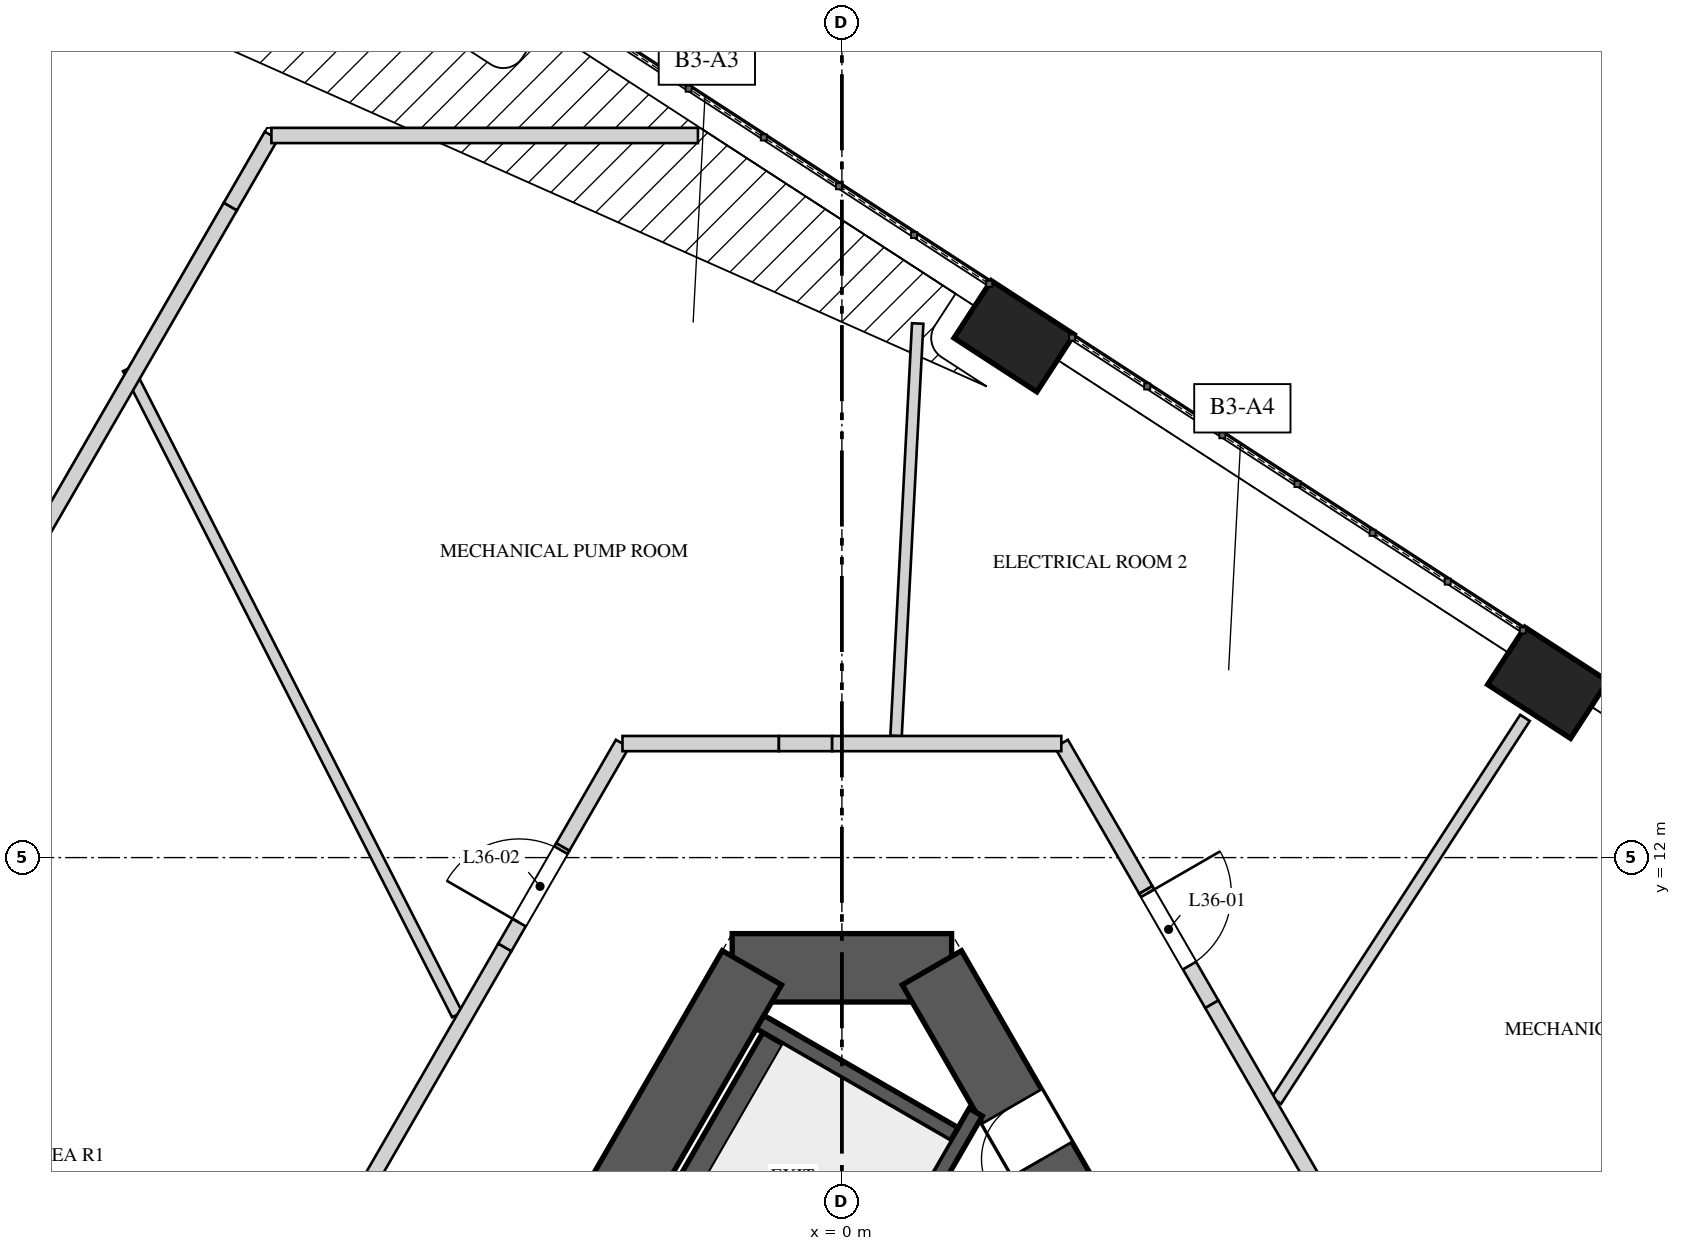
"""IFC4 building model, lengths in metres.
Left out: names, types, materials, properties, quantities, classifications, styles, units other than length and angle.
Written with IfcOpenShell. Run it as: python <this file> out.ifc"""

import sys

from ifc_helpers import new_model, si_unit, direction, frame, frame_2d, origin, origin_2d, place, context, subcontext, project, spatial, polyline, rectangle, outline, extrude, element, fill, save


model = new_model("IFC4")
c1 = context("Model", 3, precision=1e-05, world=origin(), true_north=direction((0.0, 1.0)))
c2 = subcontext(c1, "Body", "Model", "MODEL_VIEW")
j1 = project(units=[si_unit("LENGTHUNIT", "METRE"), si_unit("PLANEANGLEUNIT", "RADIAN")], contexts=[c1])
p1 = place(None, origin())
s1 = spatial("IfcSite", under=j1, at=p1, CompositionType="ELEMENT")
p2 = place(p1, origin())
s2 = spatial("IfcBuilding", under=s1, at=p2, CompositionType="ELEMENT")
p3 = place(p2, frame((0.0, 0.0, 157.6)))
s3 = spatial("IfcBuildingStorey", under=s2, at=p3, CompositionType="ELEMENT", Elevation=157.6)
p4 = place(p3, frame((1.443, 10.55, 0.0), z_axis=(0.0, 0.0, 1.0), x_axis=(-1.0, 0.0, 0.0)))
e1 = element("IfcWall", 1, at=p4, inside=s3, PredefinedType="SHEAR", context=c2, shape_type="SweptSolid", body=[
    extrude(rectangle(XDim=2.887, YDim=0.9, at=frame_2d((1.443, 0.0))), origin(), (0.0, 0.0, 1.0), 5.2),
])
p5 = place(p3, frame((-1.184, 10.55, 0.0), z_axis=(0.0, 0.0, 1.0), x_axis=(-0.500004814304, -0.866022624227, 0.0)))
e2 = element("IfcWall", 2, at=p5, inside=s3, PredefinedType="SHEAR", context=c2, shape_type="SweptSolid", body=[
    extrude(rectangle(XDim=17.09, YDim=0.9, at=frame_2d((8.545, 0.0))), origin(), (0.0, 0.0, 1.0), 5.2),
])
p6 = place(p5, frame((6.75, 0.0, 0.0)))
e3 = element("IfcOpeningElement", 3, at=p6, cuts=e2, PredefinedType="OPENING", context=c2, shape_type="SweptSolid", body=[
    extrude(rectangle(XDim=1.0, YDim=2.4, at=frame_2d((0.5, 1.2))), frame((0.0, 0.46, 0.0), z_axis=(0.0, -1.0, 0.0), x_axis=(1.0, 0.0, 0.0)), (0.0, 0.0, 1.0), 0.92),
])
p7 = place(p3, frame((9.729, -4.25, 0.0), z_axis=(0.0, 0.0, 1.0), x_axis=(-0.500004814304, 0.866022624227, 0.0)))
e4 = element("IfcWall", 4, at=p7, inside=s3, PredefinedType="SHEAR", context=c2, shape_type="SweptSolid", body=[
    extrude(rectangle(XDim=17.09, YDim=0.9, at=frame_2d((8.545, 0.0))), origin(), (0.0, 0.0, 1.0), 5.2),
])
p8 = place(p7, frame((6.82, 0.0, 0.0)))
e5 = element("IfcOpeningElement", 5, at=p8, cuts=e4, PredefinedType="OPENING", context=c2, shape_type="SweptSolid", body=[
    extrude(rectangle(XDim=1.0, YDim=2.4, at=frame_2d((0.5, 1.2))), frame((0.0, 0.46, 0.0), z_axis=(0.0, -1.0, 0.0), x_axis=(1.0, 0.0, 0.0)), (0.0, 0.0, 1.0), 0.92),
])
p9 = place(p7, frame((14.184, 0.0, 0.0)))
e6 = element("IfcOpeningElement", 6, at=p9, cuts=e4, PredefinedType="OPENING", context=c2, shape_type="SweptSolid", body=[
    extrude(rectangle(XDim=0.8, YDim=2.1, at=frame_2d((0.4, 1.05))), frame((0.0, 0.46, 0.0), z_axis=(0.0, -1.0, 0.0), x_axis=(1.0, 0.0, 0.0)), (0.0, 0.0, 1.0), 0.92),
])
for number, where, z_axis, x_axis in (
    (7, (9.286, 14.299, 0.0), (0.0, 0.0, 1.0), (-0.839, 0.545, 0.0)),
    (8, (2.265, 18.859, 0.0), (0.0, 0.0, 1.0), (-0.839, 0.545, 0.0)),
):
    element("IfcColumn", number, at=place(p3, frame(where, z_axis=z_axis, x_axis=x_axis)), inside=s3, PredefinedType="COLUMN", context=c2, shape_type="SweptSolid", body=[
        extrude(rectangle(XDim=1.3, YDim=0.9, at=origin_2d()), origin(), (0.0, 0.0, 1.0), 2.835),
    ])
p10 = place(p3, frame((-0.766, 9.772, 0.0), z_axis=(0.0, 0.0, 1.0), x_axis=(-0.500009909098, -0.866019682689, 0.0)))
e9 = element("IfcWall", 9, at=p10, inside=s3, PredefinedType="SOLIDWALL", context=c2, shape_type="SweptSolid", body=[
    extrude(rectangle(XDim=6.2, YDim=0.4, at=frame_2d((3.1, 0.0))), origin(), (0.0, 0.0, 1.0), 4.85),
])
p11 = place(p3, frame((1.761, 8.65, 0.0), z_axis=(0.0, 0.0, 1.0), x_axis=(-0.500010023241, -0.866019616786, 0.0)))
e10 = element("IfcWall", 10, at=p11, inside=s3, PredefinedType="SOLIDWALL", context=c2, shape_type="SweptSolid", body=[
    extrude(rectangle(XDim=6.491, YDim=0.2, at=frame_2d((3.246, 0.0))), origin(), (0.0, 0.0, 1.0), 4.85),
])
p12 = place(p3, frame((1.479, 8.361, 0.0), z_axis=(0.0, 0.0, 1.0), x_axis=(-0.866003658127, 0.500037662692, 0.0)))
e11 = element("IfcWall", 11, at=p12, inside=s3, PredefinedType="SOLIDWALL", context=c2, shape_type="SweptSolid", body=[
    extrude(rectangle(XDim=2.95, YDim=0.2, at=frame_2d((1.475, 0.0))), origin(), (0.0, 0.0, 1.0), 4.85),
])
p13 = place(p3, frame((-5.061, 9.934, 0.0), z_axis=(0.0, 0.0, 1.0), x_axis=(-0.453998628556, 0.891002382303, 0.0)))
e12 = element("IfcWall", 12, at=p13, inside=s3, PredefinedType="PARTITIONING", context=c2, shape_type="SweptSolid", body=[
    extrude(rectangle(XDim=9.539, YDim=0.15, at=frame_2d((4.77, 0.0))), origin(), (0.0, 0.0, 1.0), 4.85),
])
p14 = place(p3, frame((0.713, 13.6, 0.0), z_axis=(0.0, 0.0, 1.0), x_axis=(0.052344232101, 0.998629101001, 0.0)))
e13 = element("IfcWall", 13, at=p14, inside=s3, PredefinedType="PARTITIONING", context=c2, shape_type="SweptSolid", body=[
    extrude(rectangle(XDim=5.434, YDim=0.15, at=frame_2d((2.717, 0.0))), origin(), (0.0, 0.0, 1.0), 4.85),
])
p15 = place(p3, frame((8.342, 4.251, 0.0), z_axis=(0.0, 0.0, 1.0), x_axis=(0.891018796903, 0.453966412377, 0.0)))
e14 = element("IfcWall", 14, at=p15, inside=s3, PredefinedType="PARTITIONING", context=c2, shape_type="SweptSolid", body=[
    extrude(rectangle(XDim=8.011, YDim=0.15, at=frame_2d((4.005, 0.0))), origin(), (0.0, 0.0, 1.0), 4.85),
])
p16 = place(p3, frame((8.987, 13.838, 0.0), z_axis=(0.0, 0.0, 1.0), x_axis=(-0.544632548775, -0.838674780123, 0.0)))
e15 = element("IfcWall", 15, at=p16, inside=s3, PredefinedType="PARTITIONING", context=c2, shape_type="SweptSolid", body=[
    extrude(rectangle(XDim=6.006, YDim=0.15, at=frame_2d((3.003, 0.0))), origin(), (0.0, 0.0, 1.0), 4.85),
])
p17 = place(p3, frame((2.887, 13.5, 0.0), z_axis=(0.0, 0.0, 1.0), x_axis=(0.499966483153, -0.86604475388, 0.0)))
e16 = element("IfcWall", 16, at=p17, inside=s3, PredefinedType="SOLIDWALL", context=c2, shape_type="SweptSolid", body=[
    extrude(rectangle(XDim=2.223, YDim=0.2, at=frame_2d((1.111, 0.0))), origin(), (0.0, 0.0, 1.0), 4.85),
])
p18 = place(p3, frame((3.998, 11.575, 0.0), z_axis=(0.0, 0.0, 1.0), x_axis=(0.500038750527, -0.866003030001, 0.0)))
e17 = element("IfcWall", 17, at=p18, inside=s3, PredefinedType="SOLIDWALL", context=c2, shape_type="SweptSolid", body=[
    extrude(outline(polyline([(0.0, 0.0), (1.737, 0.0), (1.737, 4.15), (0.872, 4.15), (0.872, 4.85), (0.0, 4.85), (0.0, 0.0)])), frame((0.0, 0.1, 0.0), z_axis=(0.0, -1.0, 0.0), x_axis=(1.0, 0.0, 0.0)), (0.0, 0.0, 1.0), 0.2),
])
p19 = place(p18, frame((0.05, 0.0, 0.0)))
e18 = element("IfcOpeningElement", 18, at=p19, cuts=e17, PredefinedType="OPENING", context=c2, shape_type="SweptSolid", body=[
    extrude(rectangle(XDim=1.1, YDim=2.2, at=frame_2d((0.55, 1.1))), frame((0.0, 0.11, 0.0), z_axis=(0.0, -1.0, 0.0), x_axis=(1.0, 0.0, 0.0)), (0.0, 0.0, 1.0), 0.22),
])
p20 = place(p3, frame((4.867, 10.071, 0.0), z_axis=(0.0, 0.0, 1.0), x_axis=(0.50003588878, -0.866004682396, 0.0)))
e19 = element("IfcWall", 19, at=p20, inside=s3, PredefinedType="SOLIDWALL", context=c2, shape_type="SweptSolid", body=[
    extrude(rectangle(XDim=3.551, YDim=0.2, at=frame_2d((1.775, 0.0))), origin(), (0.0, 0.0, 1.0), 4.85),
])
p21 = place(p3, frame((-7.106, 6.191, 0.0), z_axis=(0.0, 0.0, 1.0), x_axis=(0.500011158634, 0.866018961248, 0.0)))
e20 = element("IfcWall", 20, at=p21, inside=s3, PredefinedType="SOLIDWALL", context=c2, shape_type="SweptSolid", body=[
    extrude(rectangle(XDim=5.344, YDim=0.2, at=frame_2d((2.672, 0.0))), origin(), (0.0, 0.0, 1.0), 4.85),
])
p22 = place(p3, frame((-4.435, 10.819, 0.0), z_axis=(0.0, 0.0, 1.0), x_axis=(0.500008507724, 0.866020491792, 0.0)))
e21 = element("IfcWall", 21, at=p22, inside=s3, PredefinedType="SOLIDWALL", context=c2, shape_type="SweptSolid", body=[
    extrude(outline(polyline([(0.0, 0.0), (1.527, 0.0), (1.527, 4.85), (1.039, 4.85), (1.039, 3.95), (0.0, 3.95), (0.0, 0.0)])), frame((0.0, 0.1, 0.0), z_axis=(0.0, -1.0, 0.0), x_axis=(1.0, 0.0, 0.0)), (0.0, 0.0, 1.0), 0.2),
])
p23 = place(p22, frame((0.377, 0.0, 0.0)))
e22 = element("IfcOpeningElement", 22, at=p23, cuts=e21, PredefinedType="OPENING", context=c2, shape_type="SweptSolid", body=[
    extrude(rectangle(XDim=1.1, YDim=2.2, at=frame_2d((0.55, 1.1))), frame((0.0, 0.11, 0.0), z_axis=(0.0, -1.0, 0.0), x_axis=(1.0, 0.0, 0.0)), (0.0, 0.0, 1.0), 0.22),
])
p24 = place(p3, frame((-3.671, 12.141, 0.0), z_axis=(0.0, 0.0, 1.0), x_axis=(0.500005339912, 0.866022320763, 0.0)))
e23 = element("IfcWall", 23, at=p24, inside=s3, PredefinedType="SOLIDWALL", context=c2, shape_type="SweptSolid", body=[
    extrude(rectangle(XDim=1.569, YDim=0.2, at=frame_2d((0.784, 0.0))), origin(), (0.0, 0.0, 1.0), 4.85),
])
p25 = place(p3, frame((-2.887, 13.5, 0.0), z_axis=(0.0, 0.0, 1.0), x_axis=(1.0, 0.0, 0.0)))
e24 = element("IfcWall", 24, at=p25, inside=s3, PredefinedType="SOLIDWALL", context=c2, shape_type="SweptSolid", body=[
    extrude(rectangle(XDim=2.058, YDim=0.2, at=frame_2d((1.029, 0.0))), origin(), (0.0, 0.0, 1.0), 4.85),
])
p26 = place(p3, frame((-0.829, 13.5, 0.0), z_axis=(0.0, 0.0, 1.0), x_axis=(1.0, 0.0, 0.0)))
e25 = element("IfcWall", 25, at=p26, inside=s3, PredefinedType="SOLIDWALL", context=c2, shape_type="SweptSolid", body=[
    extrude(rectangle(XDim=0.7, YDim=0.2, at=frame_2d((0.35, 0.0))), origin(), (0.0, 0.0, 1.0), 4.15),
])
p27 = place(p3, frame((-0.128, 13.5, 0.0), z_axis=(0.0, 0.0, 1.0), x_axis=(1.0, 0.0, 0.0)))
e26 = element("IfcWall", 26, at=p27, inside=s3, PredefinedType="SOLIDWALL", context=c2, shape_type="SweptSolid", body=[
    extrude(rectangle(XDim=3.015, YDim=0.2, at=frame_2d((1.508, 0.0))), origin(), (0.0, 0.0, 1.0), 4.85),
])
p28 = place(p3, frame((-13.449, 11.206, 0.0), z_axis=(0.0, 0.0, 1.0), x_axis=(0.500009239692, 0.86602006918, 0.0)))
e27 = element("IfcWall", 27, at=p28, inside=s3, PredefinedType="SOLIDWALL", context=c2, shape_type="SweptSolid", body=[
    extrude(rectangle(XDim=10.808, YDim=0.2, at=frame_2d((5.404, 0.0))), origin(), (0.0, 0.0, 1.0), 4.85),
])
p29 = place(p28, frame((0.391, 0.0, 0.0)))
e28 = element("IfcOpeningElement", 28, at=p29, cuts=e27, PredefinedType="OPENING", context=c2, shape_type="SweptSolid", body=[
    extrude(rectangle(XDim=1.6, YDim=2.3, at=frame_2d((0.8, 1.15))), frame((0.0, 0.11, 0.0), z_axis=(0.0, -1.0, 0.0), x_axis=(1.0, 0.0, 0.0)), (0.0, 0.0, 1.0), 0.22),
])
p30 = place(p3, frame((-8.045, 20.565, 0.0), z_axis=(0.0, 0.0, 1.0), x_axis=(0.499983569942, 0.866034889475, 0.0)))
e29 = element("IfcWall", 29, at=p30, inside=s3, PredefinedType="SOLIDWALL", context=c2, shape_type="SweptSolid", body=[
    extrude(rectangle(XDim=1.079, YDim=0.2, at=frame_2d((0.54, 0.0))), origin(), (0.0, 0.0, 1.0), 3.95),
])
p31 = place(p3, frame((-7.506, 21.5, 0.0), z_axis=(0.0, 0.0, 1.0), x_axis=(1.0, 0.0, 0.0)))
e30 = element("IfcWall", 30, at=p31, inside=s3, PredefinedType="SOLIDWALL", context=c2, shape_type="SweptSolid", body=[
    extrude(rectangle(XDim=5.612, YDim=0.2, at=frame_2d((2.806, 0.0))), origin(), (0.0, 0.0, 1.0), 4.85),
])
p32 = place(p9, origin())
e31 = element("IfcDoor", 31, at=p32, inside=s3, OperationType="SINGLE_SWING_RIGHT", PredefinedType="DOOR", context=c2, shape_type="SweptSolid", body=[
    extrude(rectangle(XDim=0.8, YDim=2.1, at=frame_2d((0.4, 1.05))), frame((0.0, 0.025, 0.0), z_axis=(0.0, -1.0, 0.0), x_axis=(1.0, 0.0, 0.0)), (0.0, 0.0, 1.0), 0.05),
])
fill(e6, e31)
p33 = place(p19, origin())
e32 = element("IfcDoor", 32, at=p33, inside=s3, OperationType="SINGLE_SWING_LEFT", PredefinedType="DOOR", context=c2, shape_type="SweptSolid", body=[
    extrude(rectangle(XDim=1.1, YDim=2.2, at=frame_2d((0.55, 1.1))), frame((0.0, 0.025, 0.0), z_axis=(0.0, -1.0, 0.0), x_axis=(1.0, 0.0, 0.0)), (0.0, 0.0, 1.0), 0.05),
])
fill(e18, e32)
p34 = place(p23, origin())
e33 = element("IfcDoor", 33, at=p34, inside=s3, OperationType="SINGLE_SWING_RIGHT", PredefinedType="DOOR", context=c2, shape_type="SweptSolid", body=[
    extrude(rectangle(XDim=1.1, YDim=2.2, at=frame_2d((0.55, 1.1))), frame((0.0, 0.025, 0.0), z_axis=(0.0, -1.0, 0.0), x_axis=(1.0, 0.0, 0.0)), (0.0, 0.0, 1.0), 0.05),
])
fill(e22, e33)
save(model, sys.argv[1])
